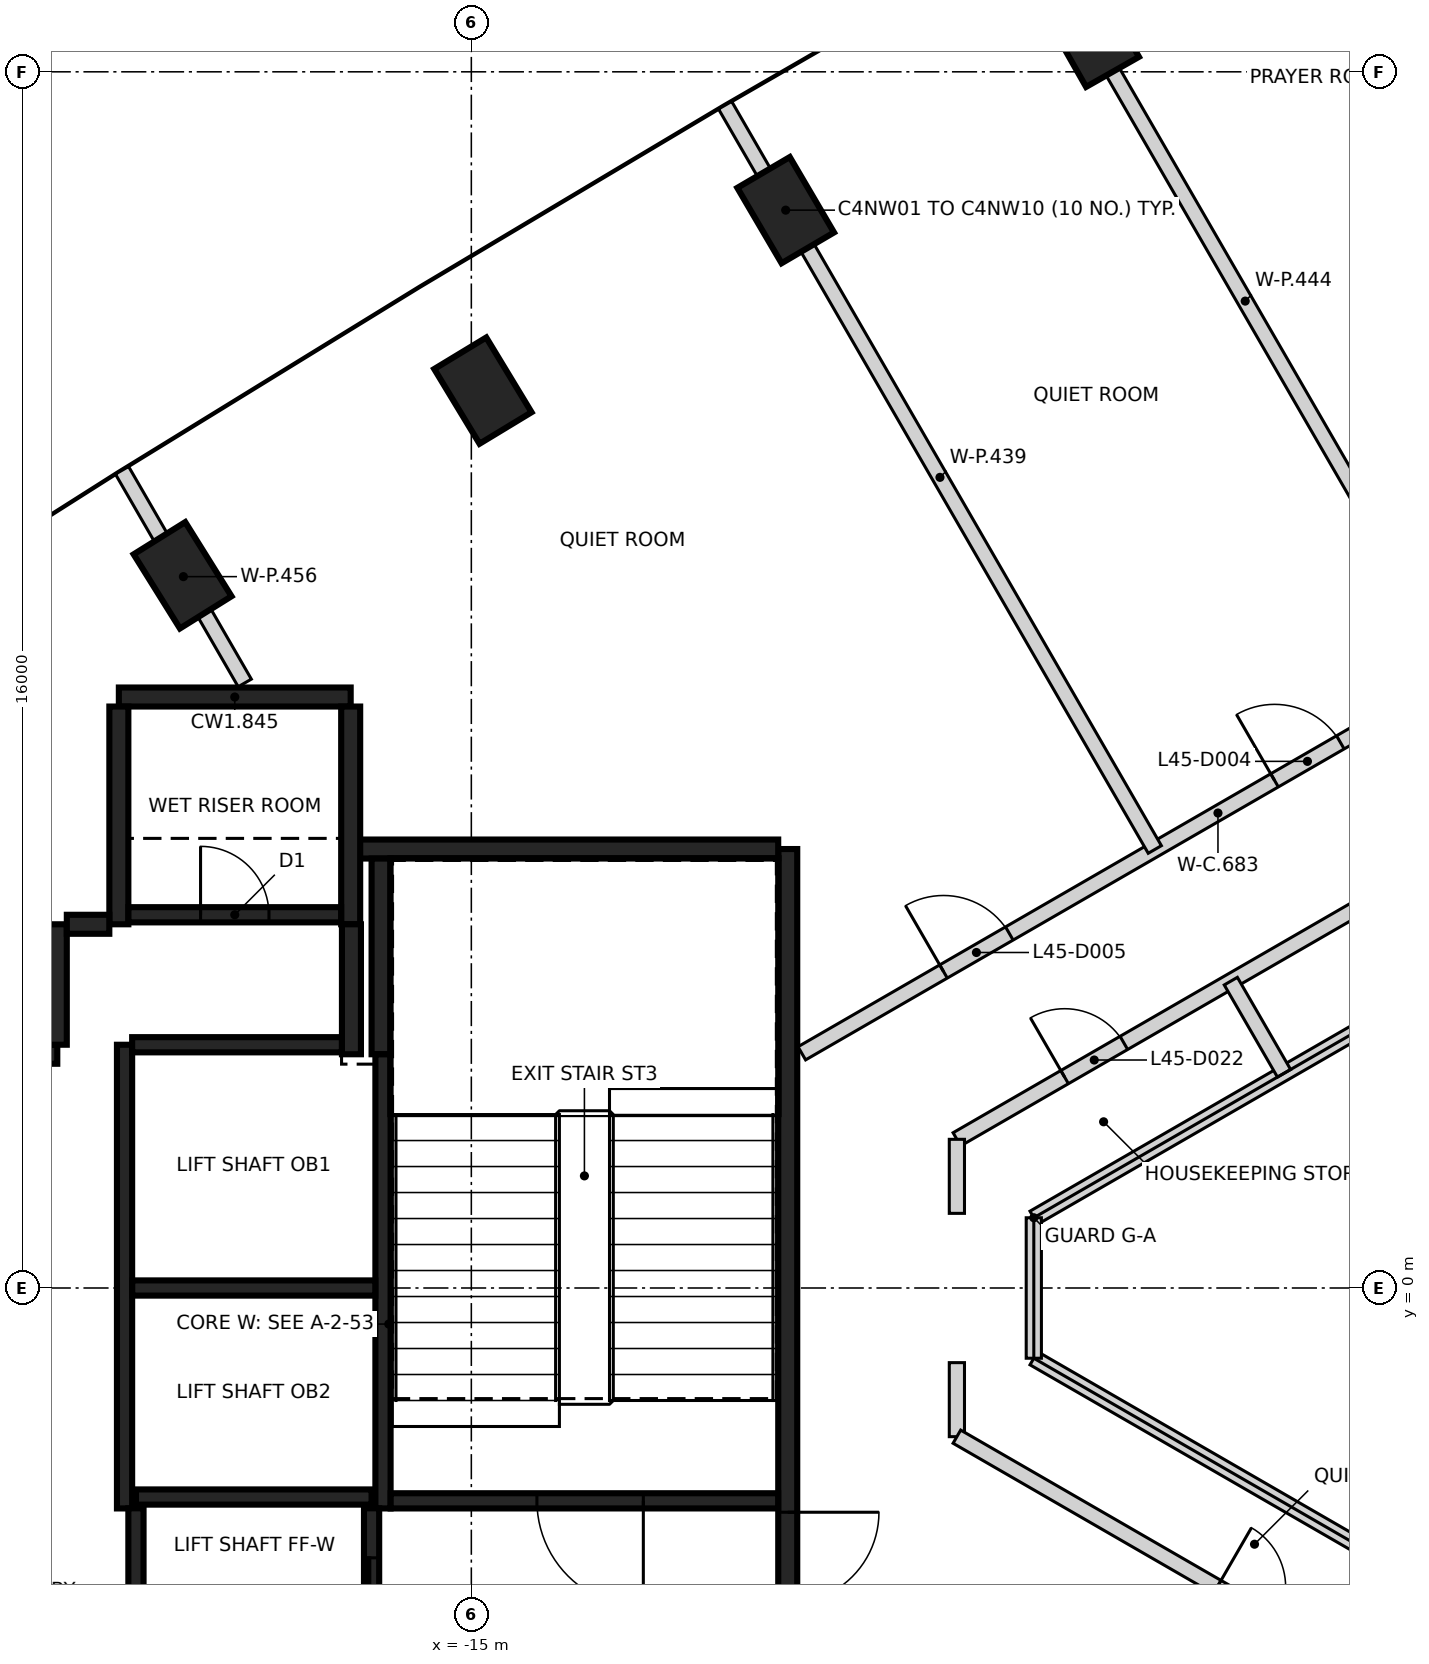
"""IFC4 building model, lengths in metres.
Left out: names, types, materials, properties, quantities, classifications, styles, units other than length and angle.
Written with IfcOpenShell. Run it as: python <this file> out.ifc"""

import sys

from ifc_helpers import new_model, si_unit, direction, frame, frame_2d, origin, origin_2d, place, context, subcontext, project, spatial, rectangle, extrude, element, fill, save


model = new_model("IFC4")
c1 = context("Model", 3, precision=1e-05, world=origin(), true_north=direction((0.0, 1.0)))
c2 = subcontext(c1, "Body", "Model", "MODEL_VIEW")
j1 = project(units=[si_unit("LENGTHUNIT", "METRE"), si_unit("PLANEANGLEUNIT", "RADIAN")], contexts=[c1])
p1 = place(None, origin())
s1 = spatial("IfcSite", under=j1, at=p1, CompositionType="ELEMENT")
p2 = place(p1, origin())
s2 = spatial("IfcBuilding", under=s1, at=p2, CompositionType="ELEMENT")
p3 = place(p2, frame((0.0, 0.0, 182.8)))
s3 = spatial("IfcBuildingStorey", under=s2, at=p3, CompositionType="ELEMENT", Elevation=182.8)
for number, where, z_axis, x_axis in (
    (1, (-6.848, 16.499, -0.35), (0.0, 0.0, 1.0), (-0.494, 0.87, 0.0)),
    (2, (-10.864, 14.18, -0.35), (0.0, 0.0, 1.0), (-0.506, 0.862, 0.0)),
    (3, (-14.848, 11.806, -0.35), (0.0, 0.0, 1.0), (-0.518, 0.855, 0.0)),
    (4, (-18.799, 9.376, -0.35), (0.0, 0.0, 1.0), (-0.529, 0.848, 0.0)),
):
    element("IfcColumn", number, at=place(p3, frame(where, z_axis=z_axis, x_axis=x_axis)), inside=s3, PredefinedType="COLUMN", context=c2, shape_type="SweptSolid", body=[
        extrude(rectangle(XDim=1.15, YDim=0.8, at=origin_2d()), origin(), (0.0, 0.0, 1.0), 3.6),
    ])
p4 = place(p3, frame((-10.837, 5.775, 0.0), z_axis=(0.0, 0.0, 1.0), x_axis=(0.0, -1.0, 0.0)))
e5 = element("IfcWall", 5, at=p4, inside=s3, PredefinedType="SHEAR", context=c2, shape_type="SweptSolid", body=[
    extrude(rectangle(XDim=11.55, YDim=0.25, at=frame_2d((5.775, 0.0))), origin(), (0.0, 0.0, 1.0), 3.25),
])
p5 = place(p4, frame((10.025, 0.0, 0.0)))
e6 = element("IfcOpeningElement", 6, at=p5, cuts=e5, PredefinedType="OPENING", context=c2, shape_type="SweptSolid", body=[
    extrude(rectangle(XDim=1.2, YDim=2.1, at=frame_2d((0.6, 1.05))), frame((0.0, 0.135, 0.0), z_axis=(0.0, -1.0, 0.0), x_axis=(1.0, 0.0, 0.0)), (0.0, 0.0, 1.0), 0.27),
])
p6 = place(p4, frame((8.725, 0.0, 0.0)))
e7 = element("IfcOpeningElement", 7, at=p6, cuts=e5, PredefinedType="OPENING", context=c2, shape_type="SweptSolid", body=[
    extrude(rectangle(XDim=1.2, YDim=2.1, at=frame_2d((0.6, 1.05))), frame((0.0, 0.135, 0.0), z_axis=(0.0, -1.0, 0.0), x_axis=(1.0, 0.0, 0.0)), (0.0, 0.0, 1.0), 0.27),
])
p7 = place(p3, frame((-16.472, 5.775, 0.0), z_axis=(0.0, 0.0, 1.0), x_axis=(1.0, 0.0, 0.0)))
e8 = element("IfcWall", 8, at=p7, inside=s3, PredefinedType="SHEAR", context=c2, shape_type="SweptSolid", body=[
    extrude(rectangle(XDim=5.51, YDim=0.25, at=frame_2d((2.755, 0.0))), origin(), (0.0, 0.0, 1.0), 3.25),
])
p8 = place(p3, frame((-19.637, 7.775, 0.0), z_axis=(0.0, 0.0, 1.0), x_axis=(1.0, 0.0, 0.0)))
e9 = element("IfcWall", 9, at=p8, inside=s3, PredefinedType="SHEAR", context=c2, shape_type="SweptSolid", body=[
    extrude(rectangle(XDim=3.05, YDim=0.25, at=frame_2d((1.525, 0.0))), origin(), (0.0, 0.0, 1.0), 3.25),
])
for number, where, z_axis, x_axis in (
    (10, (-16.587, 7.65, 0.0), (0.0, 0.0, 1.0), (0.0, -1.0, 0.0)),
    (11, (-19.637, 4.785, 0.0), (0.0, 0.0, 1.0), (0.0, 1.0, 0.0)),
):
    element("IfcWall", number, at=place(p3, frame(where, z_axis=z_axis, x_axis=x_axis)), inside=s3, PredefinedType="SHEAR", context=c2, shape_type="SweptSolid", body=[
        extrude(rectangle(XDim=2.865, YDim=0.25, at=frame_2d((1.432, 0.0))), origin(), (0.0, 0.0, 1.0), 3.25),
    ])
p9 = place(p3, frame((-16.187, 3.075, 0.0), z_axis=(0.0, 0.0, 1.0), x_axis=(0.0, 1.0, 0.0)))
e12 = element("IfcWall", 12, at=p9, inside=s3, PredefinedType="SHEAR", context=c2, shape_type="SweptSolid", body=[
    extrude(rectangle(XDim=2.575, YDim=0.25, at=frame_2d((1.287, 0.0))), origin(), (0.0, 0.0, 1.0), 3.25),
])
p10 = place(p3, frame((-22.312, 3.075, 0.0), z_axis=(0.0, 0.0, 1.0), x_axis=(1.0, 0.0, 0.0)))
e13 = element("IfcWall", 13, at=p10, inside=s3, PredefinedType="SHEAR", context=c2, shape_type="SweptSolid", body=[
    extrude(rectangle(XDim=1.865, YDim=0.25, at=frame_2d((0.932, 0.0))), origin(), (0.0, 0.0, 1.0), 3.25),
])
p11 = place(p3, frame((-16.577, 4.785, 0.0), z_axis=(0.0, 0.0, 1.0), x_axis=(0.0, -1.0, 0.0)))
e14 = element("IfcWall", 14, at=p11, inside=s3, PredefinedType="SHEAR", context=c2, shape_type="SweptSolid", body=[
    extrude(rectangle(XDim=1.71, YDim=0.25, at=frame_2d((0.855, 0.0))), origin(), (0.0, 0.0, 1.0), 3.25),
])
p12 = place(p3, frame((-20.447, 3.2, 0.0), z_axis=(0.0, 0.0, 1.0), x_axis=(0.0, 1.0, 0.0)))
e15 = element("IfcWall", 15, at=p12, inside=s3, PredefinedType="SHEAR", context=c2, shape_type="SweptSolid", body=[
    extrude(rectangle(XDim=1.584, YDim=0.25, at=frame_2d((0.792, 0.0))), origin(), (0.0, 0.0, 1.0), 3.25),
])
p13 = place(p3, frame((-20.322, 4.785, 0.0), z_axis=(0.0, 0.0, 1.0), x_axis=(1.0, 0.0, 0.0)))
e16 = element("IfcWall", 16, at=p13, inside=s3, PredefinedType="SHEAR", context=c2, shape_type="SweptSolid", body=[
    extrude(rectangle(XDim=0.559, YDim=0.25, at=frame_2d((0.28, 0.0))), origin(), (0.0, 0.0, 1.0), 3.25),
])
p14 = place(p3, frame((-16.162, 3.074, 0.0), z_axis=(0.0, 0.0, 1.0), x_axis=(0.0, -1.0, 0.0)))
e17 = element("IfcWall", 17, at=p14, inside=s3, PredefinedType="SHEAR", context=c2, shape_type="SweptSolid", body=[
    extrude(rectangle(XDim=5.974, YDim=0.2, at=frame_2d((2.987, 0.0))), origin(), (0.0, 0.0, 1.0), 3.25),
])
p15 = place(p3, frame((-19.562, -2.9, 0.0), z_axis=(0.0, 0.0, 1.0), x_axis=(0.0, 1.0, 0.0)))
e18 = element("IfcWall", 18, at=p15, inside=s3, PredefinedType="SHEAR", context=c2, shape_type="SweptSolid", body=[
    extrude(rectangle(XDim=6.1, YDim=0.2, at=frame_2d((3.05, 0.0))), origin(), (0.0, 0.0, 1.0), 3.25),
])
p16 = place(p3, frame((-10.963, -2.8, 0.0), z_axis=(0.0, 0.0, 1.0), x_axis=(-1.0, 0.0, 0.0)))
e19 = element("IfcWall", 19, at=p16, inside=s3, PredefinedType="SHEAR", context=c2, shape_type="SweptSolid", body=[
    extrude(rectangle(XDim=5.098, YDim=0.2, at=frame_2d((2.549, 0.0))), origin(), (0.0, 0.0, 1.0), 3.25),
])
p17 = place(p16, frame((1.774, 0.0, 0.0)))
e20 = element("IfcOpeningElement", 20, at=p17, cuts=e19, PredefinedType="OPENING", context=c2, shape_type="SweptSolid", body=[
    extrude(rectangle(XDim=1.4, YDim=2.1, at=frame_2d((0.7, 1.05))), frame((0.0, 0.11, 0.0), z_axis=(0.0, -1.0, 0.0), x_axis=(1.0, 0.0, 0.0)), (0.0, 0.0, 1.0), 0.22),
])
p18 = place(p3, frame((-16.263, 0.0, 0.0), z_axis=(0.0, 0.0, 1.0), x_axis=(-1.0, 0.0, 0.0)))
e21 = element("IfcWall", 21, at=p18, inside=s3, PredefinedType="SHEAR", context=c2, shape_type="SweptSolid", body=[
    extrude(rectangle(XDim=3.198, YDim=0.2, at=frame_2d((1.599, 0.0))), origin(), (0.0, 0.0, 1.0), 3.25),
])
p19 = place(p3, frame((-19.511, 4.91, 0.0), z_axis=(0.0, 0.0, 1.0), x_axis=(1.0, 0.0, 0.0)))
e22 = element("IfcWall", 22, at=p19, inside=s3, PredefinedType="SHEAR", context=c2, shape_type="SweptSolid", body=[
    extrude(rectangle(XDim=2.798, YDim=0.2, at=frame_2d((1.399, 0.0))), origin(), (0.0, 0.0, 1.0), 3.25),
])
p20 = place(p19, frame((0.949, 0.0, 0.0)))
e23 = element("IfcOpeningElement", 23, at=p20, cuts=e22, PredefinedType="OPENING", context=c2, shape_type="SweptSolid", body=[
    extrude(rectangle(XDim=0.9, YDim=2.1, at=frame_2d((0.45, 1.05))), frame((0.0, 0.11, 0.0), z_axis=(0.0, -1.0, 0.0), x_axis=(1.0, 0.0, 0.0)), (0.0, 0.0, 1.0), 0.22),
])
p21 = place(p3, frame((-19.462, 3.2, 0.0), z_axis=(0.0, 0.0, 1.0), x_axis=(1.0, 0.0, 0.0)))
e24 = element("IfcWall", 24, at=p21, inside=s3, PredefinedType="SHEAR", context=c2, shape_type="SweptSolid", body=[
    extrude(rectangle(XDim=2.759, YDim=0.2, at=frame_2d((1.379, 0.0))), origin(), (0.0, 0.0, 1.0), 3.25),
])
p22 = place(p3, frame((-19.412, -2.75, 0.0), z_axis=(0.0, 0.0, 1.0), x_axis=(1.0, 0.0, 0.0)))
e25 = element("IfcWall", 25, at=p22, inside=s3, PredefinedType="SHEAR", context=c2, shape_type="SweptSolid", body=[
    extrude(rectangle(XDim=3.1, YDim=0.2, at=frame_2d((1.55, 0.0))), origin(), (0.0, 0.0, 1.0), 3.25),
])
p23 = place(p3, frame((-16.312, -2.898, 0.0), z_axis=(0.0, 0.0, 1.0), x_axis=(0.0, -1.0, 0.0)))
e26 = element("IfcWall", 26, at=p23, inside=s3, PredefinedType="SHEAR", context=c2, shape_type="SweptSolid", body=[
    extrude(rectangle(XDim=2.651, YDim=0.2, at=frame_2d((1.325, 0.0))), origin(), (0.0, 0.0, 1.0), 3.25),
])
p24 = place(p23, frame((0.652, 0.0, 0.0)))
e27 = element("IfcOpeningElement", 27, at=p24, cuts=e26, PredefinedType="OPENING", context=c2, shape_type="SweptSolid", body=[
    extrude(rectangle(XDim=1.3, YDim=2.1, at=frame_2d((0.65, 1.05))), frame((0.0, 0.11, 0.0), z_axis=(0.0, -1.0, 0.0), x_axis=(1.0, 0.0, 0.0)), (0.0, 0.0, 1.0), 0.22),
])
p25 = place(p3, frame((-19.412, -5.549, 0.0), z_axis=(0.0, 0.0, 1.0), x_axis=(0.0, 1.0, 0.0)))
e28 = element("IfcWall", 28, at=p25, inside=s3, PredefinedType="SHEAR", context=c2, shape_type="SweptSolid", body=[
    extrude(rectangle(XDim=2.651, YDim=0.2, at=frame_2d((1.325, 0.0))), origin(), (0.0, 0.0, 1.0), 3.25),
])
p26 = place(p3, frame((-10.652, 3.087, 0.0), z_axis=(0.0, 0.0, 1.0), x_axis=(0.866016136997, 0.500016050204, 0.0)))
e29 = element("IfcWall", 29, at=p26, inside=s3, PredefinedType="PARTITIONING", context=c2, shape_type="SweptSolid", body=[
    extrude(rectangle(XDim=12.645, YDim=0.2, at=frame_2d((6.322, 0.0))), origin(), (0.0, 0.0, 1.0), 3.25),
])
p27 = place(p26, frame((10.817, 0.0, 0.0)))
e30 = element("IfcOpeningElement", 30, at=p27, cuts=e29, PredefinedType="OPENING", context=c2, shape_type="SweptSolid", body=[
    extrude(rectangle(XDim=1.0, YDim=2.1, at=frame_2d((0.5, 1.05))), frame((0.0, 0.11, 0.0), z_axis=(0.0, -1.0, 0.0), x_axis=(1.0, 0.0, 0.0)), (0.0, 0.0, 1.0), 0.22),
])
p28 = place(p26, frame((7.182, 0.0, 0.0)))
e31 = element("IfcOpeningElement", 31, at=p28, cuts=e29, PredefinedType="OPENING", context=c2, shape_type="SweptSolid", body=[
    extrude(rectangle(XDim=1.0, YDim=2.1, at=frame_2d((0.5, 1.05))), frame((0.0, 0.11, 0.0), z_axis=(0.0, -1.0, 0.0), x_axis=(1.0, 0.0, 0.0)), (0.0, 0.0, 1.0), 0.22),
])
p29 = place(p26, frame((2.153, 0.0, 0.0)))
e32 = element("IfcOpeningElement", 32, at=p29, cuts=e29, PredefinedType="OPENING", context=c2, shape_type="SweptSolid", body=[
    extrude(rectangle(XDim=1.0, YDim=2.1, at=frame_2d((0.5, 1.05))), frame((0.0, 0.11, 0.0), z_axis=(0.0, -1.0, 0.0), x_axis=(1.0, 0.0, 0.0)), (0.0, 0.0, 1.0), 0.22),
])
p30 = place(p3, frame((-8.612, 1.956, 0.0), z_axis=(0.0, 0.0, 1.0), x_axis=(0.866034386606, 0.499984440973, 0.0)))
e33 = element("IfcWall", 33, at=p30, inside=s3, PredefinedType="PARTITIONING", context=c2, shape_type="SweptSolid", body=[
    extrude(rectangle(XDim=12.96, YDim=0.2, at=frame_2d((6.48, 0.0))), origin(), (0.0, 0.0, 1.0), 3.25),
])
p31 = place(p30, frame((8.105, 0.0, 0.0)))
e34 = element("IfcOpeningElement", 34, at=p31, cuts=e33, PredefinedType="OPENING", context=c2, shape_type="SweptSolid", body=[
    extrude(rectangle(XDim=0.9, YDim=2.1, at=frame_2d((0.45, 1.05))), frame((0.0, 0.11, 0.0), z_axis=(0.0, -1.0, 0.0), x_axis=(1.0, 0.0, 0.0)), (0.0, 0.0, 1.0), 0.22),
])
p32 = place(p30, frame((1.637, 0.0, 0.0)))
e35 = element("IfcOpeningElement", 35, at=p32, cuts=e33, PredefinedType="OPENING", context=c2, shape_type="SweptSolid", body=[
    extrude(rectangle(XDim=0.9, YDim=2.1, at=frame_2d((0.45, 1.05))), frame((0.0, 0.11, 0.0), z_axis=(0.0, -1.0, 0.0), x_axis=(1.0, 0.0, 0.0)), (0.0, 0.0, 1.0), 0.22),
])
p33 = place(p3, frame((-8.612, -1.956, 0.0), z_axis=(0.0, 0.0, 1.0), x_axis=(0.0, 1.0, 0.0)))
e36 = element("IfcWall", 36, at=p33, inside=s3, PredefinedType="PARTITIONING", context=c2, shape_type="SweptSolid", body=[
    extrude(rectangle(XDim=0.974, YDim=0.2, at=frame_2d((0.487, 0.0))), origin(), (0.0, 0.0, 1.0), 3.25),
])
p34 = place(p3, frame((-8.612, -1.956, 0.0), z_axis=(0.0, 0.0, 1.0), x_axis=(0.866034386606, -0.499984440973, 0.0)))
e37 = element("IfcWall", 37, at=p34, inside=s3, PredefinedType="PARTITIONING", context=c2, shape_type="SweptSolid", body=[
    extrude(rectangle(XDim=12.96, YDim=0.2, at=frame_2d((6.48, 0.0))), origin(), (0.0, 0.0, 1.0), 3.25),
])
p35 = place(p34, frame((3.955, 0.0, 0.0)))
e38 = element("IfcOpeningElement", 38, at=p35, cuts=e37, PredefinedType="OPENING", context=c2, shape_type="SweptSolid", body=[
    extrude(rectangle(XDim=0.9, YDim=2.1, at=frame_2d((0.45, 1.05))), frame((0.0, 0.11, 0.0), z_axis=(0.0, -1.0, 0.0), x_axis=(1.0, 0.0, 0.0)), (0.0, 0.0, 1.0), 0.22),
])
p36 = place(p34, frame((10.424, 0.0, 0.0)))
e39 = element("IfcOpeningElement", 39, at=p36, cuts=e37, PredefinedType="OPENING", context=c2, shape_type="SweptSolid", body=[
    extrude(rectangle(XDim=0.9, YDim=2.1, at=frame_2d((0.45, 1.05))), frame((0.0, 0.11, 0.0), z_axis=(0.0, -1.0, 0.0), x_axis=(1.0, 0.0, 0.0)), (0.0, 0.0, 1.0), 0.22),
])
p37 = place(p3, frame((-8.612, 0.982, 0.0), z_axis=(0.0, 0.0, 1.0), x_axis=(0.0, 1.0, 0.0)))
e40 = element("IfcWall", 40, at=p37, inside=s3, PredefinedType="PARTITIONING", context=c2, shape_type="SweptSolid", body=[
    extrude(rectangle(XDim=0.974, YDim=0.2, at=frame_2d((0.487, 0.0))), origin(), (0.0, 0.0, 1.0), 3.25),
])
p38 = place(p3, frame((-19.596, 10.757, 0.0), z_axis=(0.0, 0.0, 1.0), x_axis=(0.499984162302, -0.866034547491, 0.0)))
e41 = element("IfcWall", 41, at=p38, inside=s3, PredefinedType="PARTITIONING", context=c2, shape_type="SweptSolid", body=[
    extrude(rectangle(XDim=3.23, YDim=0.2, at=frame_2d((1.615, 0.0))), origin(), (0.0, 0.0, 1.0), 3.25),
])
p39 = place(p3, frame((-11.661, 15.561, 0.0), z_axis=(0.0, 0.0, 1.0), x_axis=(0.500012795616, -0.866018016106, 0.0)))
e42 = element("IfcWall", 42, at=p39, inside=s3, PredefinedType="PARTITIONING", context=c2, shape_type="SweptSolid", body=[
    extrude(rectangle(XDim=11.306, YDim=0.2, at=frame_2d((5.653, 0.0))), origin(), (0.0, 0.0, 1.0), 3.25),
])
for number, where, z_axis, x_axis in (
    (43, (-7.6, 0.924, 0.0), (0.0, 0.0, 1.0), (0.866, 0.5, 0.0)),
    (44, (-7.6, -0.924, 0.0), (0.0, 0.0, 1.0), (0.866, -0.5, 0.0)),
):
    element("IfcWall", number, at=place(p3, frame(where, z_axis=z_axis, x_axis=x_axis)), inside=s3, PredefinedType="PARTITIONING", context=c2, shape_type="SweptSolid", body=[
        extrude(rectangle(XDim=12.24, YDim=0.2, at=frame_2d((6.12, 0.0))), origin(), (0.0, 0.0, 1.0), 3.25),
    ])
p40 = place(p3, frame((-7.6, -0.924, 0.0), z_axis=(0.0, 0.0, 1.0), x_axis=(0.0, 1.0, 0.0)))
e45 = element("IfcWall", 45, at=p40, inside=s3, PredefinedType="PARTITIONING", context=c2, shape_type="SweptSolid", body=[
    extrude(rectangle(XDim=1.848, YDim=0.2, at=frame_2d((0.924, 0.0))), origin(), (0.0, 0.0, 1.0), 3.25),
])
p41 = place(p3, frame((-7.646, 17.879, 0.0), z_axis=(0.0, 0.0, 1.0), x_axis=(0.500047691386, -0.865997867399, 0.0)))
e46 = element("IfcWall", 46, at=p41, inside=s3, PredefinedType="PARTITIONING", context=c2, shape_type="SweptSolid", body=[
    extrude(rectangle(XDim=11.306, YDim=0.2, at=frame_2d((5.653, 0.0))), origin(), (0.0, 0.0, 1.0), 3.25),
])
p42 = place(p3, frame((-5.008, 4.037, 0.0), z_axis=(0.0, 0.0, 1.0), x_axis=(0.49996389635, -0.866046247233, 0.0)))
e47 = element("IfcWall", 47, at=p42, inside=s3, PredefinedType="PARTITIONING", context=c2, shape_type="SweptSolid", body=[
    extrude(rectangle(XDim=1.4, YDim=0.2, at=frame_2d((0.7, 0.0))), origin(), (0.0, 0.0, 1.0), 3.25),
])
p43 = place(p3, frame((-3.597, 20.142, 0.0), z_axis=(0.0, 0.0, 1.0), x_axis=(0.499864035625, -0.866103888623, 0.0)))
e48 = element("IfcWall", 48, at=p43, inside=s3, PredefinedType="PARTITIONING", context=c2, shape_type="SweptSolid", body=[
    extrude(rectangle(XDim=6.817, YDim=0.2, at=frame_2d((3.408, 0.0))), origin(), (0.0, 0.0, 1.0), 3.25),
])
p44 = place(p24, origin())
e49 = element("IfcDoor", 49, at=p44, inside=s3, OperationType="SLIDING_TO_RIGHT", PredefinedType="DOOR", context=c2, shape_type="SweptSolid", body=[
    extrude(rectangle(XDim=1.3, YDim=2.1, at=frame_2d((0.65, 1.05))), frame((0.0, 0.025, 0.0), z_axis=(0.0, -1.0, 0.0), x_axis=(1.0, 0.0, 0.0)), (0.0, 0.0, 1.0), 0.05),
])
fill(e27, e49)
p45 = place(p6, origin())
e50 = element("IfcDoor", 50, at=p45, inside=s3, OperationType="SINGLE_SWING_RIGHT", PredefinedType="DOOR", context=c2, shape_type="SweptSolid", body=[
    extrude(rectangle(XDim=1.2, YDim=2.1, at=frame_2d((0.6, 1.05))), frame((0.0, 0.025, 0.0), z_axis=(0.0, -1.0, 0.0), x_axis=(1.0, 0.0, 0.0)), (0.0, 0.0, 1.0), 0.05),
])
fill(e7, e50)
p46 = place(p17, origin())
e51 = element("IfcDoor", 51, at=p46, inside=s3, OperationType="SINGLE_SWING_RIGHT", PredefinedType="DOOR", context=c2, shape_type="SweptSolid", body=[
    extrude(rectangle(XDim=1.4, YDim=2.1, at=frame_2d((0.7, 1.05))), frame((0.0, 0.025, 0.0), z_axis=(0.0, -1.0, 0.0), x_axis=(1.0, 0.0, 0.0)), (0.0, 0.0, 1.0), 0.05),
])
fill(e20, e51)
p47 = place(p20, origin())
e52 = element("IfcDoor", 52, at=p47, inside=s3, OperationType="SINGLE_SWING_LEFT", PredefinedType="DOOR", context=c2, shape_type="SweptSolid", body=[
    extrude(rectangle(XDim=0.9, YDim=2.1, at=frame_2d((0.45, 1.05))), frame((0.0, 0.025, 0.0), z_axis=(0.0, -1.0, 0.0), x_axis=(1.0, 0.0, 0.0)), (0.0, 0.0, 1.0), 0.05),
])
fill(e23, e52)
p48 = place(p28, origin())
e53 = element("IfcDoor", 53, at=p48, inside=s3, OperationType="SINGLE_SWING_LEFT", PredefinedType="DOOR", context=c2, shape_type="SweptSolid", body=[
    extrude(rectangle(XDim=1.0, YDim=2.1, at=frame_2d((0.5, 1.05))), frame((0.0, 0.025, 0.0), z_axis=(0.0, -1.0, 0.0), x_axis=(1.0, 0.0, 0.0)), (0.0, 0.0, 1.0), 0.05),
])
fill(e31, e53)
p49 = place(p29, origin())
e54 = element("IfcDoor", 54, at=p49, inside=s3, OperationType="SINGLE_SWING_LEFT", PredefinedType="DOOR", context=c2, shape_type="SweptSolid", body=[
    extrude(rectangle(XDim=1.0, YDim=2.1, at=frame_2d((0.5, 1.05))), frame((0.0, 0.025, 0.0), z_axis=(0.0, -1.0, 0.0), x_axis=(1.0, 0.0, 0.0)), (0.0, 0.0, 1.0), 0.05),
])
fill(e32, e54)
p50 = place(p32, frame((0.9, 0.0, 0.0), z_axis=(0.0, 0.0, 1.0), x_axis=(-1.0, 0.0, 0.0)))
e55 = element("IfcDoor", 55, at=p50, inside=s3, OperationType="SINGLE_SWING_LEFT", PredefinedType="DOOR", context=c2, shape_type="SweptSolid", body=[
    extrude(rectangle(XDim=0.9, YDim=2.1, at=frame_2d((0.45, 1.05))), frame((0.0, 0.025, 0.0), z_axis=(0.0, -1.0, 0.0), x_axis=(1.0, 0.0, 0.0)), (0.0, 0.0, 1.0), 0.05),
])
fill(e35, e55)
save(model, sys.argv[1])
